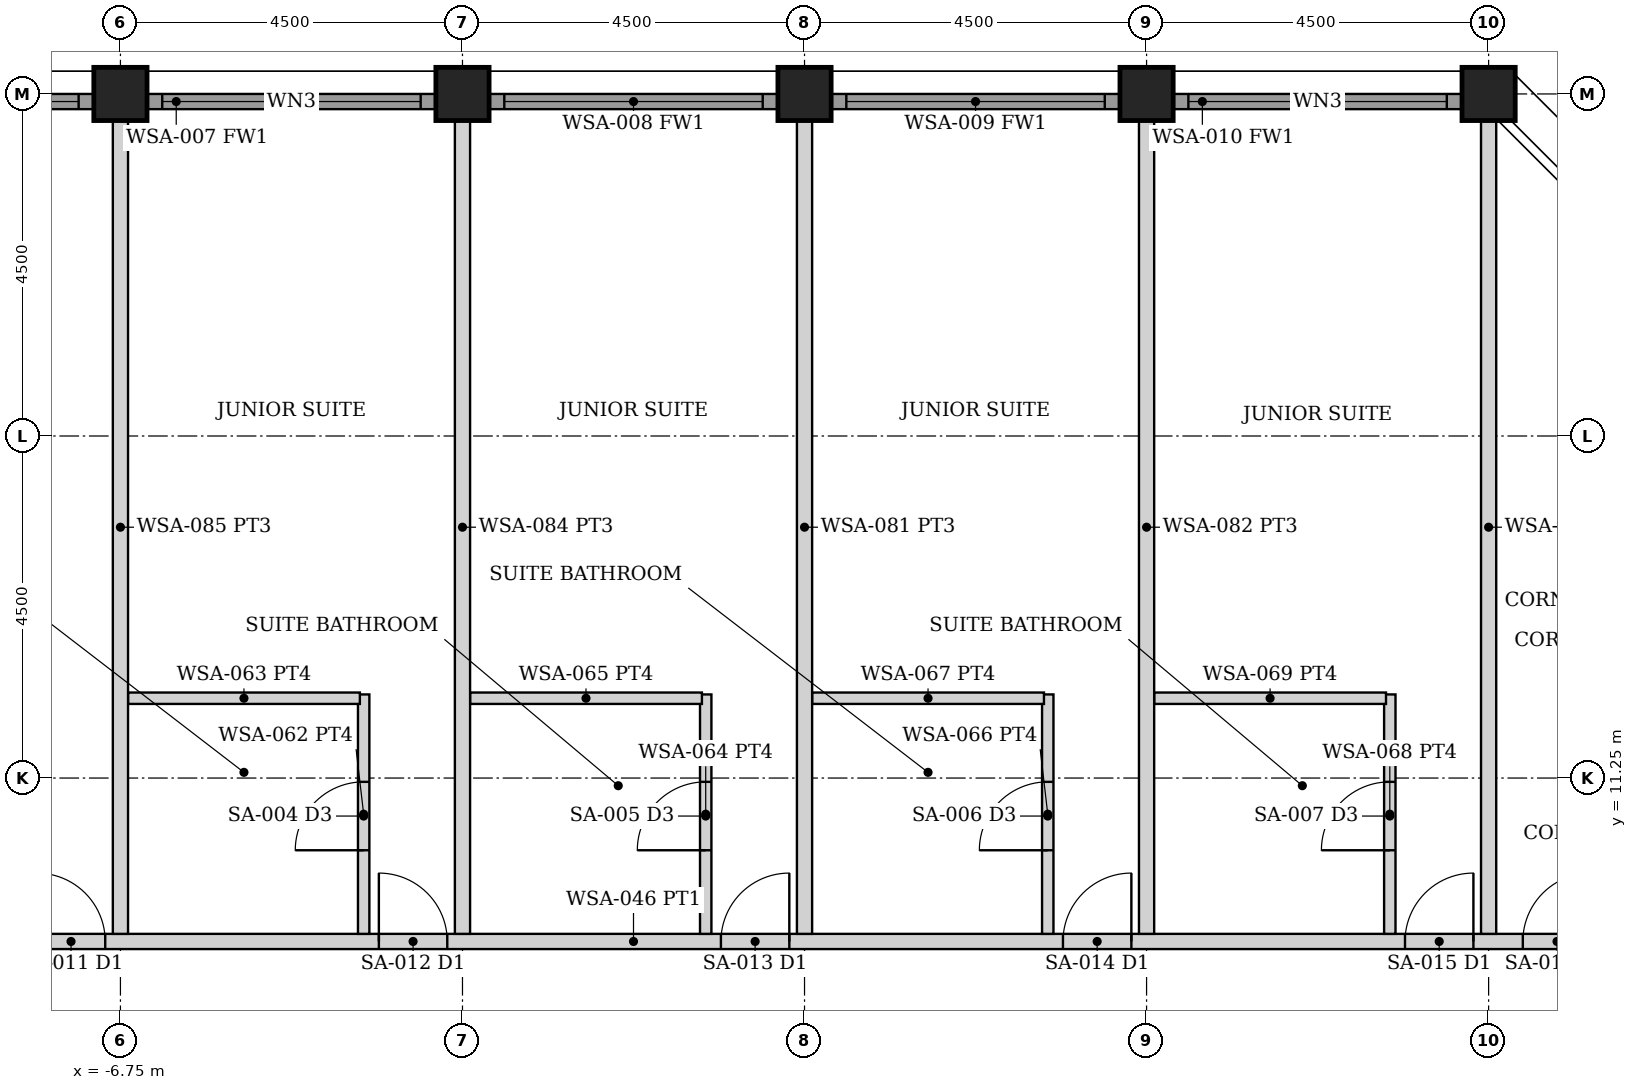
"""IFC4 building model, lengths in metres.
Left out: names, types, materials, properties, quantities, classifications, styles, units other than length and angle.
Written with IfcOpenShell. Run it as: python <this file> out.ifc"""

import sys

from ifc_helpers import new_model, si_unit, direction, frame, frame_2d, origin, origin_2d, place, context, subcontext, project, spatial, rectangle, hollow_rectangle, extrude, element, fill, save


model = new_model("IFC4")
c1 = context("Model", 3, precision=1e-05, world=origin(), true_north=direction((0.0, 1.0)))
c2 = subcontext(c1, "Body", "Model", "MODEL_VIEW")
j1 = project(units=[si_unit("LENGTHUNIT", "METRE"), si_unit("PLANEANGLEUNIT", "RADIAN")], contexts=[c1])
p1 = place(None, origin())
s1 = spatial("IfcSite", under=j1, at=p1, CompositionType="ELEMENT")
p2 = place(p1, origin())
s2 = spatial("IfcBuilding", under=s1, at=p2, CompositionType="ELEMENT")
p3 = place(p2, frame((0.0, 0.0, 200.8)))
s3 = spatial("IfcBuildingStorey", under=s2, at=p3, CompositionType="ELEMENT", Elevation=200.8)
for number, where, z_axis, x_axis in (
    (1, (-6.75, 20.25, 0.0), (0.0, 0.0, 1.0), (0.0, 1.0, 0.0)),
    (2, (-2.25, 20.25, 0.0), (0.0, 0.0, 1.0), (0.0, 1.0, 0.0)),
    (3, (2.25, 20.25, 0.0), (0.0, 0.0, 1.0), (0.0, 1.0, 0.0)),
    (4, (6.75, 20.25, 0.0), (0.0, 0.0, 1.0), (0.0, 1.0, 0.0)),
    (5, (11.25, 20.25, 0.0), (0.0, 0.0, 1.0), (0.0, 1.0, 0.0)),
):
    element("IfcColumn", number, at=place(p3, frame(where, z_axis=z_axis, x_axis=x_axis)), inside=s3, PredefinedType="COLUMN", context=c2, shape_type="SweptSolid", body=[
        extrude(hollow_rectangle(XDim=0.7, YDim=0.7, WallThickness=0.045, at=origin_2d()), origin(), (0.0, 0.0, 1.0), 3.75),
    ])
p4 = place(p3, frame((-10.895, 20.15, 0.0), z_axis=(0.0, 0.0, 1.0), x_axis=(1.0, 0.0, 0.0)))
e6 = element("IfcWall", 6, at=p4, inside=s3, PredefinedType="SOLIDWALL", context=c2, shape_type="SweptSolid", body=[
    extrude(rectangle(XDim=3.79, YDim=0.2, at=frame_2d((1.895, 0.0))), origin(), (0.0, 0.0, 1.0), 2.629),
])
p5 = place(p4, frame((0.195, 0.0, 0.3)))
e7 = element("IfcOpeningElement", 7, at=p5, cuts=e6, PredefinedType="OPENING", context=c2, shape_type="SweptSolid", body=[
    extrude(rectangle(XDim=3.4, YDim=2.179, at=frame_2d((1.7, 1.089))), frame((0.0, 0.11, 0.0), z_axis=(0.0, -1.0, 0.0), x_axis=(1.0, 0.0, 0.0)), (0.0, 0.0, 1.0), 0.22),
])
p6 = place(p3, frame((-6.395, 20.15, 0.0), z_axis=(0.0, 0.0, 1.0), x_axis=(1.0, 0.0, 0.0)))
e8 = element("IfcWall", 8, at=p6, inside=s3, PredefinedType="SOLIDWALL", context=c2, shape_type="SweptSolid", body=[
    extrude(rectangle(XDim=3.79, YDim=0.2, at=frame_2d((1.895, 0.0))), origin(), (0.0, 0.0, 1.0), 2.629),
])
p7 = place(p6, frame((0.195, 0.0, 0.3)))
e9 = element("IfcOpeningElement", 9, at=p7, cuts=e8, PredefinedType="OPENING", context=c2, shape_type="SweptSolid", body=[
    extrude(rectangle(XDim=3.4, YDim=2.179, at=frame_2d((1.7, 1.089))), frame((0.0, 0.11, 0.0), z_axis=(0.0, -1.0, 0.0), x_axis=(1.0, 0.0, 0.0)), (0.0, 0.0, 1.0), 0.22),
])
p8 = place(p3, frame((-1.895, 20.15, 0.0), z_axis=(0.0, 0.0, 1.0), x_axis=(1.0, 0.0, 0.0)))
e10 = element("IfcWall", 10, at=p8, inside=s3, PredefinedType="SOLIDWALL", context=c2, shape_type="SweptSolid", body=[
    extrude(rectangle(XDim=3.79, YDim=0.2, at=frame_2d((1.895, 0.0))), origin(), (0.0, 0.0, 1.0), 2.629),
])
p9 = place(p8, frame((0.195, 0.0, 0.3)))
e11 = element("IfcOpeningElement", 11, at=p9, cuts=e10, PredefinedType="OPENING", context=c2, shape_type="SweptSolid", body=[
    extrude(rectangle(XDim=3.4, YDim=2.179, at=frame_2d((1.7, 1.089))), frame((0.0, 0.11, 0.0), z_axis=(0.0, -1.0, 0.0), x_axis=(1.0, 0.0, 0.0)), (0.0, 0.0, 1.0), 0.22),
])
p10 = place(p3, frame((2.605, 20.15, 0.0), z_axis=(0.0, 0.0, 1.0), x_axis=(1.0, 0.0, 0.0)))
e12 = element("IfcWall", 12, at=p10, inside=s3, PredefinedType="SOLIDWALL", context=c2, shape_type="SweptSolid", body=[
    extrude(rectangle(XDim=3.79, YDim=0.2, at=frame_2d((1.895, 0.0))), origin(), (0.0, 0.0, 1.0), 2.629),
])
p11 = place(p10, frame((0.195, 0.0, 0.3)))
e13 = element("IfcOpeningElement", 13, at=p11, cuts=e12, PredefinedType="OPENING", context=c2, shape_type="SweptSolid", body=[
    extrude(rectangle(XDim=3.4, YDim=2.179, at=frame_2d((1.7, 1.089))), frame((0.0, 0.11, 0.0), z_axis=(0.0, -1.0, 0.0), x_axis=(1.0, 0.0, 0.0)), (0.0, 0.0, 1.0), 0.22),
])
p12 = place(p3, frame((7.105, 20.15, 0.0), z_axis=(0.0, 0.0, 1.0), x_axis=(1.0, 0.0, 0.0)))
e14 = element("IfcWall", 14, at=p12, inside=s3, PredefinedType="SOLIDWALL", context=c2, shape_type="SweptSolid", body=[
    extrude(rectangle(XDim=3.79, YDim=0.2, at=frame_2d((1.895, 0.0))), origin(), (0.0, 0.0, 1.0), 2.629),
])
p13 = place(p12, frame((0.195, 0.0, 0.3)))
e15 = element("IfcOpeningElement", 15, at=p13, cuts=e14, PredefinedType="OPENING", context=c2, shape_type="SweptSolid", body=[
    extrude(rectangle(XDim=3.4, YDim=2.179, at=frame_2d((1.7, 1.089))), frame((0.0, 0.11, 0.0), z_axis=(0.0, -1.0, 0.0), x_axis=(1.0, 0.0, 0.0)), (0.0, 0.0, 1.0), 0.22),
])
p14 = place(p3, frame((-20.05, 9.1, 0.0), z_axis=(0.0, 0.0, 1.0), x_axis=(1.0, 0.0, 0.0)))
e16 = element("IfcWall", 16, at=p14, inside=s3, PredefinedType="PARTITIONING", context=c2, shape_type="SweptSolid", body=[
    extrude(rectangle(XDim=40.1, YDim=0.2, at=frame_2d((20.05, 0.0))), origin(), (0.0, 0.0, 1.0), 2.629),
])
p15 = place(p14, frame((12.2, 0.0, 0.0)))
e17 = element("IfcOpeningElement", 17, at=p15, cuts=e16, PredefinedType="OPENING", context=c2, shape_type="SweptSolid", body=[
    extrude(rectangle(XDim=0.9, YDim=2.1, at=frame_2d((0.45, 1.05))), frame((0.0, 0.11, 0.0), z_axis=(0.0, -1.0, 0.0), x_axis=(1.0, 0.0, 0.0)), (0.0, 0.0, 1.0), 0.22),
])
p16 = place(p14, frame((16.7, 0.0, 0.0)))
e18 = element("IfcOpeningElement", 18, at=p16, cuts=e16, PredefinedType="OPENING", context=c2, shape_type="SweptSolid", body=[
    extrude(rectangle(XDim=0.9, YDim=2.1, at=frame_2d((0.45, 1.05))), frame((0.0, 0.11, 0.0), z_axis=(0.0, -1.0, 0.0), x_axis=(1.0, 0.0, 0.0)), (0.0, 0.0, 1.0), 0.22),
])
p17 = place(p14, frame((21.2, 0.0, 0.0)))
e19 = element("IfcOpeningElement", 19, at=p17, cuts=e16, PredefinedType="OPENING", context=c2, shape_type="SweptSolid", body=[
    extrude(rectangle(XDim=0.9, YDim=2.1, at=frame_2d((0.45, 1.05))), frame((0.0, 0.11, 0.0), z_axis=(0.0, -1.0, 0.0), x_axis=(1.0, 0.0, 0.0)), (0.0, 0.0, 1.0), 0.22),
])
p18 = place(p14, frame((25.7, 0.0, 0.0)))
e20 = element("IfcOpeningElement", 20, at=p18, cuts=e16, PredefinedType="OPENING", context=c2, shape_type="SweptSolid", body=[
    extrude(rectangle(XDim=0.9, YDim=2.1, at=frame_2d((0.45, 1.05))), frame((0.0, 0.11, 0.0), z_axis=(0.0, -1.0, 0.0), x_axis=(1.0, 0.0, 0.0)), (0.0, 0.0, 1.0), 0.22),
])
p19 = place(p14, frame((30.2, 0.0, 0.0)))
e21 = element("IfcOpeningElement", 21, at=p19, cuts=e16, PredefinedType="OPENING", context=c2, shape_type="SweptSolid", body=[
    extrude(rectangle(XDim=0.9, YDim=2.1, at=frame_2d((0.45, 1.05))), frame((0.0, 0.11, 0.0), z_axis=(0.0, -1.0, 0.0), x_axis=(1.0, 0.0, 0.0)), (0.0, 0.0, 1.0), 0.22),
])
p20 = place(p14, frame((31.75, 0.0, 0.0)))
e22 = element("IfcOpeningElement", 22, at=p20, cuts=e16, PredefinedType="OPENING", context=c2, shape_type="SweptSolid", body=[
    extrude(rectangle(XDim=0.9, YDim=2.1, at=frame_2d((0.45, 1.05))), frame((0.0, 0.11, 0.0), z_axis=(0.0, -1.0, 0.0), x_axis=(1.0, 0.0, 0.0)), (0.0, 0.0, 1.0), 0.22),
])
p21 = place(p14, frame((7.45, 0.0, 0.0)))
e23 = element("IfcOpeningElement", 23, at=p21, cuts=e16, PredefinedType="OPENING", context=c2, shape_type="SweptSolid", body=[
    extrude(rectangle(XDim=0.9, YDim=2.1, at=frame_2d((0.45, 1.05))), frame((0.0, 0.11, 0.0), z_axis=(0.0, -1.0, 0.0), x_axis=(1.0, 0.0, 0.0)), (0.0, 0.0, 1.0), 0.22),
])
p22 = place(p3, frame((-3.55, 9.2, 0.0), z_axis=(0.0, 0.0, 1.0), x_axis=(0.0, 1.0, 0.0)))
e24 = element("IfcWall", 24, at=p22, inside=s3, PredefinedType="PARTITIONING", context=c2, shape_type="SweptSolid", body=[
    extrude(rectangle(XDim=3.15, YDim=0.15, at=frame_2d((1.575, 0.0))), origin(), (0.0, 0.0, 1.0), 2.629),
])
p23 = place(p22, frame((1.1, 0.0, 0.0)))
e25 = element("IfcOpeningElement", 25, at=p23, cuts=e24, PredefinedType="OPENING", context=c2, shape_type="SweptSolid", body=[
    extrude(rectangle(XDim=0.9, YDim=2.1, at=frame_2d((0.45, 1.05))), frame((0.0, 0.085, 0.0), z_axis=(0.0, -1.0, 0.0), x_axis=(1.0, 0.0, 0.0)), (0.0, 0.0, 1.0), 0.17),
])
p24 = place(p3, frame((-6.65, 12.3, 0.0), z_axis=(0.0, 0.0, 1.0), x_axis=(1.0, 0.0, 0.0)))
e26 = element("IfcWall", 26, at=p24, inside=s3, PredefinedType="PARTITIONING", context=c2, shape_type="SweptSolid", body=[
    extrude(rectangle(XDim=3.05, YDim=0.15, at=frame_2d((1.525, 0.0))), origin(), (0.0, 0.0, 1.0), 2.629),
])
p25 = place(p3, frame((0.95, 9.2, 0.0), z_axis=(0.0, 0.0, 1.0), x_axis=(0.0, 1.0, 0.0)))
e27 = element("IfcWall", 27, at=p25, inside=s3, PredefinedType="PARTITIONING", context=c2, shape_type="SweptSolid", body=[
    extrude(rectangle(XDim=3.15, YDim=0.15, at=frame_2d((1.575, 0.0))), origin(), (0.0, 0.0, 1.0), 2.629),
])
p26 = place(p25, frame((1.1, 0.0, 0.0)))
e28 = element("IfcOpeningElement", 28, at=p26, cuts=e27, PredefinedType="OPENING", context=c2, shape_type="SweptSolid", body=[
    extrude(rectangle(XDim=0.9, YDim=2.1, at=frame_2d((0.45, 1.05))), frame((0.0, 0.085, 0.0), z_axis=(0.0, -1.0, 0.0), x_axis=(1.0, 0.0, 0.0)), (0.0, 0.0, 1.0), 0.17),
])
p27 = place(p3, frame((-2.15, 12.3, 0.0), z_axis=(0.0, 0.0, 1.0), x_axis=(1.0, 0.0, 0.0)))
e29 = element("IfcWall", 29, at=p27, inside=s3, PredefinedType="PARTITIONING", context=c2, shape_type="SweptSolid", body=[
    extrude(rectangle(XDim=3.05, YDim=0.15, at=frame_2d((1.525, 0.0))), origin(), (0.0, 0.0, 1.0), 2.629),
])
p28 = place(p3, frame((5.45, 9.2, 0.0), z_axis=(0.0, 0.0, 1.0), x_axis=(0.0, 1.0, 0.0)))
e30 = element("IfcWall", 30, at=p28, inside=s3, PredefinedType="PARTITIONING", context=c2, shape_type="SweptSolid", body=[
    extrude(rectangle(XDim=3.15, YDim=0.15, at=frame_2d((1.575, 0.0))), origin(), (0.0, 0.0, 1.0), 2.629),
])
p29 = place(p28, frame((1.1, 0.0, 0.0)))
e31 = element("IfcOpeningElement", 31, at=p29, cuts=e30, PredefinedType="OPENING", context=c2, shape_type="SweptSolid", body=[
    extrude(rectangle(XDim=0.9, YDim=2.1, at=frame_2d((0.45, 1.05))), frame((0.0, 0.085, 0.0), z_axis=(0.0, -1.0, 0.0), x_axis=(1.0, 0.0, 0.0)), (0.0, 0.0, 1.0), 0.17),
])
p30 = place(p3, frame((2.35, 12.3, 0.0), z_axis=(0.0, 0.0, 1.0), x_axis=(1.0, 0.0, 0.0)))
e32 = element("IfcWall", 32, at=p30, inside=s3, PredefinedType="PARTITIONING", context=c2, shape_type="SweptSolid", body=[
    extrude(rectangle(XDim=3.05, YDim=0.15, at=frame_2d((1.525, 0.0))), origin(), (0.0, 0.0, 1.0), 2.629),
])
p31 = place(p3, frame((9.95, 9.2, 0.0), z_axis=(0.0, 0.0, 1.0), x_axis=(0.0, 1.0, 0.0)))
e33 = element("IfcWall", 33, at=p31, inside=s3, PredefinedType="PARTITIONING", context=c2, shape_type="SweptSolid", body=[
    extrude(rectangle(XDim=3.15, YDim=0.15, at=frame_2d((1.575, 0.0))), origin(), (0.0, 0.0, 1.0), 2.629),
])
p32 = place(p31, frame((1.1, 0.0, 0.0)))
e34 = element("IfcOpeningElement", 34, at=p32, cuts=e33, PredefinedType="OPENING", context=c2, shape_type="SweptSolid", body=[
    extrude(rectangle(XDim=0.9, YDim=2.1, at=frame_2d((0.45, 1.05))), frame((0.0, 0.085, 0.0), z_axis=(0.0, -1.0, 0.0), x_axis=(1.0, 0.0, 0.0)), (0.0, 0.0, 1.0), 0.17),
])
p33 = place(p3, frame((6.85, 12.3, 0.0), z_axis=(0.0, 0.0, 1.0), x_axis=(1.0, 0.0, 0.0)))
e35 = element("IfcWall", 35, at=p33, inside=s3, PredefinedType="PARTITIONING", context=c2, shape_type="SweptSolid", body=[
    extrude(rectangle(XDim=3.05, YDim=0.15, at=frame_2d((1.525, 0.0))), origin(), (0.0, 0.0, 1.0), 2.629),
])
for number, where, z_axis, x_axis in (
    (36, (-6.75, 9.2, 0.0), (0.0, 0.0, 1.0), (0.0, 1.0, 0.0)),
    (37, (-2.25, 9.2, 0.0), (0.0, 0.0, 1.0), (0.0, 1.0, 0.0)),
    (38, (2.25, 9.2, 0.0), (0.0, 0.0, 1.0), (0.0, 1.0, 0.0)),
    (39, (6.75, 9.2, 0.0), (0.0, 0.0, 1.0), (0.0, 1.0, 0.0)),
    (40, (11.25, 9.2, 0.0), (0.0, 0.0, 1.0), (0.0, 1.0, 0.0)),
):
    element("IfcWall", number, at=place(p3, frame(where, z_axis=z_axis, x_axis=x_axis)), inside=s3, PredefinedType="PARTITIONING", context=c2, shape_type="SweptSolid", body=[
        extrude(rectangle(XDim=10.7, YDim=0.2, at=frame_2d((5.35, 0.0))), origin(), (0.0, 0.0, 1.0), 2.629),
    ])
p34 = place(p5, origin())
e41 = element("IfcWindow", 41, at=p34, inside=s3, PartitioningType="SINGLE_PANEL", PredefinedType="WINDOW", context=c2, shape_type="SweptSolid", body=[
    extrude(rectangle(XDim=3.4, YDim=2.179, at=frame_2d((1.7, 1.089))), frame((0.0, 0.03, 0.0), z_axis=(0.0, -1.0, 0.0), x_axis=(1.0, 0.0, 0.0)), (0.0, 0.0, 1.0), 0.06),
])
fill(e7, e41)
p35 = place(p7, origin())
e42 = element("IfcWindow", 42, at=p35, inside=s3, PartitioningType="SINGLE_PANEL", PredefinedType="WINDOW", context=c2, shape_type="SweptSolid", body=[
    extrude(rectangle(XDim=3.4, YDim=2.179, at=frame_2d((1.7, 1.089))), frame((0.0, 0.03, 0.0), z_axis=(0.0, -1.0, 0.0), x_axis=(1.0, 0.0, 0.0)), (0.0, 0.0, 1.0), 0.06),
])
fill(e9, e42)
p36 = place(p9, origin())
e43 = element("IfcWindow", 43, at=p36, inside=s3, PartitioningType="SINGLE_PANEL", PredefinedType="WINDOW", context=c2, shape_type="SweptSolid", body=[
    extrude(rectangle(XDim=3.4, YDim=2.179, at=frame_2d((1.7, 1.089))), frame((0.0, 0.03, 0.0), z_axis=(0.0, -1.0, 0.0), x_axis=(1.0, 0.0, 0.0)), (0.0, 0.0, 1.0), 0.06),
])
fill(e11, e43)
p37 = place(p11, origin())
e44 = element("IfcWindow", 44, at=p37, inside=s3, PartitioningType="SINGLE_PANEL", PredefinedType="WINDOW", context=c2, shape_type="SweptSolid", body=[
    extrude(rectangle(XDim=3.4, YDim=2.179, at=frame_2d((1.7, 1.089))), frame((0.0, 0.03, 0.0), z_axis=(0.0, -1.0, 0.0), x_axis=(1.0, 0.0, 0.0)), (0.0, 0.0, 1.0), 0.06),
])
fill(e13, e44)
p38 = place(p13, origin())
e45 = element("IfcWindow", 45, at=p38, inside=s3, PartitioningType="SINGLE_PANEL", PredefinedType="WINDOW", context=c2, shape_type="SweptSolid", body=[
    extrude(rectangle(XDim=3.4, YDim=2.179, at=frame_2d((1.7, 1.089))), frame((0.0, 0.03, 0.0), z_axis=(0.0, -1.0, 0.0), x_axis=(1.0, 0.0, 0.0)), (0.0, 0.0, 1.0), 0.06),
])
fill(e15, e45)
p39 = place(p15, origin())
e46 = element("IfcDoor", 46, at=p39, inside=s3, OperationType="SINGLE_SWING_LEFT", PredefinedType="DOOR", context=c2, shape_type="SweptSolid", body=[
    extrude(rectangle(XDim=0.9, YDim=2.1, at=frame_2d((0.45, 1.05))), frame((0.0, 0.025, 0.0), z_axis=(0.0, -1.0, 0.0), x_axis=(1.0, 0.0, 0.0)), (0.0, 0.0, 1.0), 0.05),
])
fill(e17, e46)
p40 = place(p16, origin())
e47 = element("IfcDoor", 47, at=p40, inside=s3, OperationType="SINGLE_SWING_LEFT", PredefinedType="DOOR", context=c2, shape_type="SweptSolid", body=[
    extrude(rectangle(XDim=0.9, YDim=2.1, at=frame_2d((0.45, 1.05))), frame((0.0, 0.025, 0.0), z_axis=(0.0, -1.0, 0.0), x_axis=(1.0, 0.0, 0.0)), (0.0, 0.0, 1.0), 0.05),
])
fill(e18, e47)
p41 = place(p23, origin())
e48 = element("IfcDoor", 48, at=p41, inside=s3, OperationType="SINGLE_SWING_LEFT", PredefinedType="DOOR", context=c2, shape_type="SweptSolid", body=[
    extrude(rectangle(XDim=0.9, YDim=2.1, at=frame_2d((0.45, 1.05))), frame((0.0, 0.025, 0.0), z_axis=(0.0, -1.0, 0.0), x_axis=(1.0, 0.0, 0.0)), (0.0, 0.0, 1.0), 0.05),
])
fill(e25, e48)
p42 = place(p17, origin())
e49 = element("IfcDoor", 49, at=p42, inside=s3, OperationType="SINGLE_SWING_RIGHT", PredefinedType="DOOR", context=c2, shape_type="SweptSolid", body=[
    extrude(rectangle(XDim=0.9, YDim=2.1, at=frame_2d((0.45, 1.05))), frame((0.0, 0.025, 0.0), z_axis=(0.0, -1.0, 0.0), x_axis=(1.0, 0.0, 0.0)), (0.0, 0.0, 1.0), 0.05),
])
fill(e19, e49)
p43 = place(p26, origin())
e50 = element("IfcDoor", 50, at=p43, inside=s3, OperationType="SINGLE_SWING_LEFT", PredefinedType="DOOR", context=c2, shape_type="SweptSolid", body=[
    extrude(rectangle(XDim=0.9, YDim=2.1, at=frame_2d((0.45, 1.05))), frame((0.0, 0.025, 0.0), z_axis=(0.0, -1.0, 0.0), x_axis=(1.0, 0.0, 0.0)), (0.0, 0.0, 1.0), 0.05),
])
fill(e28, e50)
p44 = place(p18, origin())
e51 = element("IfcDoor", 51, at=p44, inside=s3, OperationType="SINGLE_SWING_RIGHT", PredefinedType="DOOR", context=c2, shape_type="SweptSolid", body=[
    extrude(rectangle(XDim=0.9, YDim=2.1, at=frame_2d((0.45, 1.05))), frame((0.0, 0.025, 0.0), z_axis=(0.0, -1.0, 0.0), x_axis=(1.0, 0.0, 0.0)), (0.0, 0.0, 1.0), 0.05),
])
fill(e20, e51)
p45 = place(p29, origin())
e52 = element("IfcDoor", 52, at=p45, inside=s3, OperationType="SINGLE_SWING_LEFT", PredefinedType="DOOR", context=c2, shape_type="SweptSolid", body=[
    extrude(rectangle(XDim=0.9, YDim=2.1, at=frame_2d((0.45, 1.05))), frame((0.0, 0.025, 0.0), z_axis=(0.0, -1.0, 0.0), x_axis=(1.0, 0.0, 0.0)), (0.0, 0.0, 1.0), 0.05),
])
fill(e31, e52)
p46 = place(p19, origin())
e53 = element("IfcDoor", 53, at=p46, inside=s3, OperationType="SINGLE_SWING_RIGHT", PredefinedType="DOOR", context=c2, shape_type="SweptSolid", body=[
    extrude(rectangle(XDim=0.9, YDim=2.1, at=frame_2d((0.45, 1.05))), frame((0.0, 0.025, 0.0), z_axis=(0.0, -1.0, 0.0), x_axis=(1.0, 0.0, 0.0)), (0.0, 0.0, 1.0), 0.05),
])
fill(e21, e53)
p47 = place(p32, origin())
e54 = element("IfcDoor", 54, at=p47, inside=s3, OperationType="SINGLE_SWING_LEFT", PredefinedType="DOOR", context=c2, shape_type="SweptSolid", body=[
    extrude(rectangle(XDim=0.9, YDim=2.1, at=frame_2d((0.45, 1.05))), frame((0.0, 0.025, 0.0), z_axis=(0.0, -1.0, 0.0), x_axis=(1.0, 0.0, 0.0)), (0.0, 0.0, 1.0), 0.05),
])
fill(e34, e54)
p48 = place(p20, origin())
e55 = element("IfcDoor", 55, at=p48, inside=s3, OperationType="SINGLE_SWING_RIGHT", PredefinedType="DOOR", context=c2, shape_type="SweptSolid", body=[
    extrude(rectangle(XDim=0.9, YDim=2.1, at=frame_2d((0.45, 1.05))), frame((0.0, 0.025, 0.0), z_axis=(0.0, -1.0, 0.0), x_axis=(1.0, 0.0, 0.0)), (0.0, 0.0, 1.0), 0.05),
])
fill(e22, e55)
save(model, sys.argv[1])
